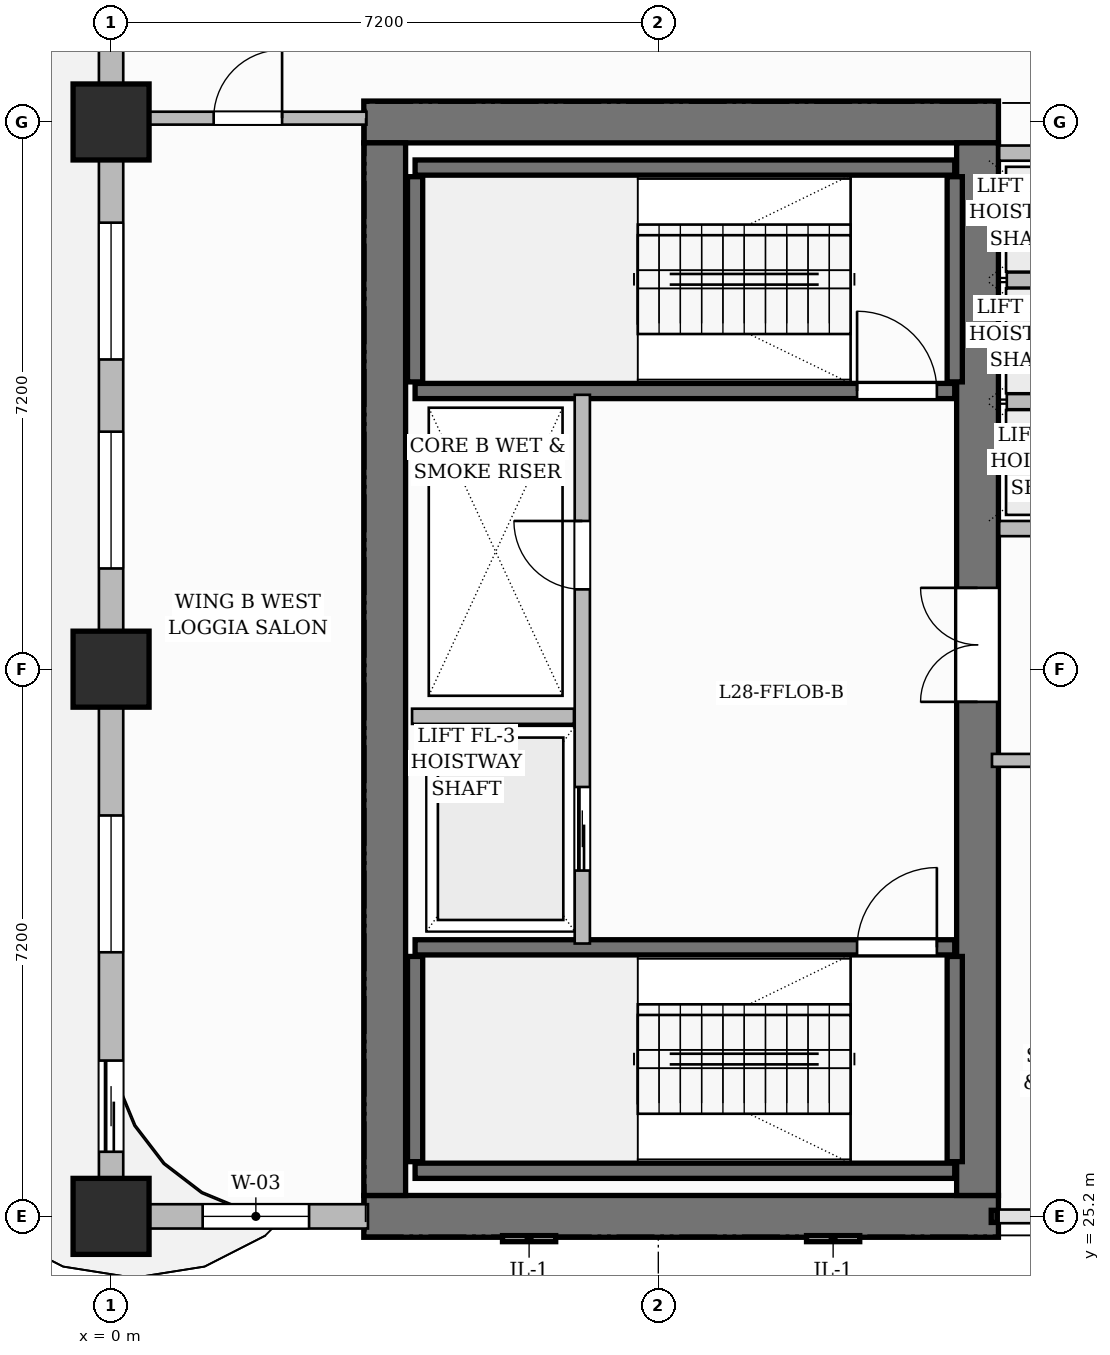
"""IFC4 building model, lengths in metres.
Left out: names, types, materials, properties, quantities, classifications, styles, units other than length and angle.
Written with IfcOpenShell. Run it as: python <this file> out.ifc"""

import sys

from ifc_helpers import new_model, si_unit, direction, frame, frame_2d, origin, origin_2d, place, context, subcontext, project, spatial, rectangle, extrude, source, transform, mapped, element, fill, save


model = new_model("IFC4")
c1 = context("Model", 3, precision=1e-05, world=origin(), true_north=direction((0.0, 1.0)))
c2 = subcontext(c1, "Body", "Model", "MODEL_VIEW")
j1 = project(units=[si_unit("LENGTHUNIT", "METRE"), si_unit("PLANEANGLEUNIT", "RADIAN")], contexts=[c1])
p1 = place(None, origin())
s1 = spatial("IfcSite", under=j1, at=p1, CompositionType="ELEMENT")
p2 = place(p1, origin())
s2 = spatial("IfcBuilding", under=s1, at=p2, CompositionType="ELEMENT")
p3 = place(p2, frame((0.0, 0.0, 115.5)))
s3 = spatial("IfcBuildingStorey", under=s2, at=p3, CompositionType="ELEMENT", Elevation=115.5)
for number, where, z_axis, x_axis in (
    (1, (3.325, 25.2, 0.0), (0.0, 0.0, 1.0), (1.0, 0.0, 0.0)),
    (2, (3.325, 39.6, 0.0), (0.0, 0.0, 1.0), (1.0, 0.0, 0.0)),
):
    element("IfcWall", number, at=place(p3, frame(where, z_axis=z_axis, x_axis=x_axis)), inside=s3, PredefinedType="SHEAR", context=c2, shape_type="SweptSolid", body=[
        extrude(rectangle(XDim=8.35, YDim=0.55, at=frame_2d((4.175, 0.0))), origin(), (0.0, 0.0, 1.0), 3.7),
    ])
p4 = place(p3, frame((3.6, 25.475, 0.0), z_axis=(0.0, 0.0, 1.0), x_axis=(0.0, 1.0, 0.0)))
e3 = element("IfcWall", 3, at=p4, inside=s3, PredefinedType="SHEAR", context=c2, shape_type="SweptSolid", body=[
    extrude(rectangle(XDim=13.85, YDim=0.55, at=frame_2d((6.925, 0.0))), origin(), (0.0, 0.0, 1.0), 3.7),
])
p5 = place(p3, frame((11.4, 25.475, 0.0), z_axis=(0.0, 0.0, 1.0), x_axis=(0.0, 1.0, 0.0)))
e4 = element("IfcWall", 4, at=p5, inside=s3, PredefinedType="SHEAR", context=c2, shape_type="SweptSolid", body=[
    extrude(rectangle(XDim=13.85, YDim=0.55, at=frame_2d((6.925, 0.0))), origin(), (0.0, 0.0, 1.0), 3.7),
])
p6 = place(p5, frame((6.495, 0.0, 0.0)))
e5 = element("IfcOpeningElement", 5, at=p6, cuts=e4, PredefinedType="OPENING", context=c2, shape_type="SweptSolid", body=[
    extrude(rectangle(XDim=1.5, YDim=2.2, at=frame_2d((0.75, 1.1))), frame((0.0, 0.285, 0.0), z_axis=(0.0, -1.0, 0.0), x_axis=(1.0, 0.0, 0.0)), (0.0, 0.0, 1.0), 0.57),
])
m1 = source(origin(), c2, "Body", "SweptSolid", [
    extrude(rectangle(XDim=1.0, YDim=1.0, at=origin_2d()), origin(), (0.0, 0.0, 1.0), 3.7),
])
for number, where, z_axis, x_axis in (
    (6, (0.0, 25.2, 0.0), (0.0, 0.0, 1.0), (1.0, 0.0, 0.0)),
    (7, (0.0, 32.4, 0.0), (0.0, 0.0, 1.0), (1.0, 0.0, 0.0)),
    (8, (0.0, 39.6, 0.0), (0.0, 0.0, 1.0), (1.0, 0.0, 0.0)),
):
    element("IfcColumn", number, at=place(p3, frame(where, z_axis=z_axis, x_axis=x_axis)), inside=s3, PredefinedType="COLUMN", context=c2, shape_type="MappedRepresentation", body=[
        mapped(m1, transform((0.0, 0.0, 0.0), scale=1.0)),
    ])
p7 = place(p3, frame((4.0, 25.8, 0.0), z_axis=(0.0, 0.0, 1.0), x_axis=(1.0, 0.0, 0.0)))
e9 = element("IfcWall", 9, at=p7, inside=s3, PredefinedType="SHEAR", context=c2, shape_type="SweptSolid", body=[
    extrude(rectangle(XDim=7.1, YDim=0.2, at=frame_2d((3.55, 0.0))), origin(), (0.0, 0.0, 1.0), 3.7),
])
for number, where, z_axis, x_axis in (
    (10, (4.0, 25.92, 0.0), (0.0, 0.0, 1.0), (0.0, 1.0, 0.0)),
    (11, (11.1, 25.92, 0.0), (0.0, 0.0, 1.0), (0.0, 1.0, 0.0)),
):
    element("IfcWall", number, at=place(p3, frame(where, z_axis=z_axis, x_axis=x_axis)), inside=s3, PredefinedType="SHEAR", context=c2, shape_type="SweptSolid", body=[
        extrude(rectangle(XDim=2.7, YDim=0.2, at=frame_2d((1.35, 0.0))), origin(), (0.0, 0.0, 1.0), 3.7),
    ])
p8 = place(p3, frame((4.0, 28.74, 0.0), z_axis=(0.0, 0.0, 1.0), x_axis=(1.0, 0.0, 0.0)))
e12 = element("IfcWall", 12, at=p8, inside=s3, PredefinedType="SHEAR", context=c2, shape_type="SweptSolid", body=[
    extrude(rectangle(XDim=7.1, YDim=0.2, at=frame_2d((3.55, 0.0))), origin(), (0.0, 0.0, 1.0), 3.7),
])
p9 = place(p8, frame((5.815, 0.0, 0.0)))
e13 = element("IfcOpeningElement", 13, at=p9, cuts=e12, PredefinedType="OPENING", context=c2, shape_type="SweptSolid", body=[
    extrude(rectangle(XDim=1.05, YDim=2.2, at=frame_2d((0.525, 1.1))), frame((0.0, 0.11, 0.0), z_axis=(0.0, -1.0, 0.0), x_axis=(1.0, 0.0, 0.0)), (0.0, 0.0, 1.0), 0.22),
])
p10 = place(p3, frame((4.0, 39.0, 0.0), z_axis=(0.0, 0.0, 1.0), x_axis=(1.0, 0.0, 0.0)))
e14 = element("IfcWall", 14, at=p10, inside=s3, PredefinedType="SHEAR", context=c2, shape_type="SweptSolid", body=[
    extrude(rectangle(XDim=7.1, YDim=0.2, at=frame_2d((3.55, 0.0))), origin(), (0.0, 0.0, 1.0), 3.7),
])
for number, where, z_axis, x_axis in (
    (15, (4.0, 36.18, 0.0), (0.0, 0.0, 1.0), (0.0, 1.0, 0.0)),
    (16, (11.1, 36.18, 0.0), (0.0, 0.0, 1.0), (0.0, 1.0, 0.0)),
):
    element("IfcWall", number, at=place(p3, frame(where, z_axis=z_axis, x_axis=x_axis)), inside=s3, PredefinedType="SHEAR", context=c2, shape_type="SweptSolid", body=[
        extrude(rectangle(XDim=2.7, YDim=0.2, at=frame_2d((1.35, 0.0))), origin(), (0.0, 0.0, 1.0), 3.7),
    ])
p11 = place(p3, frame((4.0, 36.06, 0.0), z_axis=(0.0, 0.0, 1.0), x_axis=(1.0, 0.0, 0.0)))
e17 = element("IfcWall", 17, at=p11, inside=s3, PredefinedType="SHEAR", context=c2, shape_type="SweptSolid", body=[
    extrude(rectangle(XDim=7.1, YDim=0.2, at=frame_2d((3.55, 0.0))), origin(), (0.0, 0.0, 1.0), 3.7),
])
p12 = place(p11, frame((5.815, 0.0, 0.0)))
e18 = element("IfcOpeningElement", 18, at=p12, cuts=e17, PredefinedType="OPENING", context=c2, shape_type="SweptSolid", body=[
    extrude(rectangle(XDim=1.05, YDim=2.2, at=frame_2d((0.525, 1.1))), frame((0.0, 0.11, 0.0), z_axis=(0.0, -1.0, 0.0), x_axis=(1.0, 0.0, 0.0)), (0.0, 0.0, 1.0), 0.22),
])
p13 = place(p3, frame((6.2, 28.79, 0.0), z_axis=(0.0, 0.0, 1.0), x_axis=(0.0, 1.0, 0.0)))
e19 = element("IfcWall", 19, at=p13, inside=s3, PredefinedType="PARTITIONING", context=c2, shape_type="SweptSolid", body=[
    extrude(rectangle(XDim=7.22, YDim=0.2, at=frame_2d((3.61, 0.0))), origin(), (0.0, 0.0, 1.0), 3.45),
])
p14 = place(p13, frame((4.66, 0.0, 0.0)))
e20 = element("IfcOpeningElement", 20, at=p14, cuts=e19, PredefinedType="OPENING", context=c2, shape_type="SweptSolid", body=[
    extrude(rectangle(XDim=0.9, YDim=2.1, at=frame_2d((0.45, 1.05))), frame((0.0, 0.11, 0.0), z_axis=(0.0, -1.0, 0.0), x_axis=(1.0, 0.0, 0.0)), (0.0, 0.0, 1.0), 0.22),
])
p15 = place(p13, frame((0.96, 0.0, 0.0)))
e21 = element("IfcOpeningElement", 21, at=p15, cuts=e19, PredefinedType="OPENING", context=c2, shape_type="SweptSolid", body=[
    extrude(rectangle(XDim=1.1, YDim=2.2, at=frame_2d((0.55, 1.1))), frame((0.0, 0.11, 0.0), z_axis=(0.0, -1.0, 0.0), x_axis=(1.0, 0.0, 0.0)), (0.0, 0.0, 1.0), 0.22),
])
p16 = place(p3, frame((3.96, 31.78, 0.0), z_axis=(0.0, 0.0, 1.0), x_axis=(1.0, 0.0, 0.0)))
e22 = element("IfcWall", 22, at=p16, inside=s3, PredefinedType="PARTITIONING", context=c2, shape_type="SweptSolid", body=[
    extrude(rectangle(XDim=2.13, YDim=0.2, at=frame_2d((1.065, 0.0))), origin(), (0.0, 0.0, 1.0), 3.45),
])
for number, where, z_axis, x_axis in (
    (23, (11.685, 34.25, 0.0), (0.0, 0.0, 1.0), (1.0, 0.0, 0.0)),
    (24, (11.685, 39.19, 0.0), (0.0, 0.0, 1.0), (1.0, 0.0, 0.0)),
):
    element("IfcWall", number, at=place(p3, frame(where, z_axis=z_axis, x_axis=x_axis)), inside=s3, PredefinedType="PARTITIONING", context=c2, shape_type="SweptSolid", body=[
        extrude(rectangle(XDim=1.985, YDim=0.2, at=frame_2d((0.992, 0.0))), origin(), (0.0, 0.0, 1.0), 3.45),
    ])
for number, where, z_axis, x_axis in (
    (25, (11.785, 35.92, 0.0), (0.0, 0.0, 1.0), (1.0, 0.0, 0.0)),
    (26, (11.785, 37.52, 0.0), (0.0, 0.0, 1.0), (1.0, 0.0, 0.0)),
):
    element("IfcWall", number, at=place(p3, frame(where, z_axis=z_axis, x_axis=x_axis)), inside=s3, PredefinedType="PARTITIONING", context=c2, shape_type="SweptSolid", body=[
        extrude(rectangle(XDim=1.785, YDim=0.2, at=frame_2d((0.893, 0.0))), origin(), (0.0, 0.0, 1.0), 3.45),
    ])
p17 = place(p3, frame((0.24, 39.65, 0.0), z_axis=(0.0, 0.0, 1.0), x_axis=(1.0, 0.0, 0.0)))
e27 = element("IfcWall", 27, at=p17, inside=s3, PredefinedType="PARTITIONING", context=c2, shape_type="SweptSolid", body=[
    extrude(rectangle(XDim=3.12, YDim=0.17, at=frame_2d((1.56, 0.0))), origin(), (0.0, 0.0, 1.0), 3.45),
])
p18 = place(p17, frame((1.11, 0.0, 0.0)))
e28 = element("IfcOpeningElement", 28, at=p18, cuts=e27, PredefinedType="OPENING", context=c2, shape_type="SweptSolid", body=[
    extrude(rectangle(XDim=0.9, YDim=2.15, at=frame_2d((0.45, 1.075))), frame((0.0, 0.095, 0.0), z_axis=(0.0, -1.0, 0.0), x_axis=(1.0, 0.0, 0.0)), (0.0, 0.0, 1.0), 0.19),
])
p19 = place(p3, frame((11.59, 31.2, 0.0), z_axis=(0.0, 0.0, 1.0), x_axis=(1.0, 0.0, 0.0)))
e29 = element("IfcWall", 29, at=p19, inside=s3, PredefinedType="PARTITIONING", context=c2, shape_type="SweptSolid", body=[
    extrude(rectangle(XDim=3.37, YDim=0.17, at=frame_2d((1.685, 0.0))), origin(), (0.0, 0.0, 1.0), 3.45),
])
p20 = place(p19, frame((1.185, 0.0, 0.0)))
e30 = element("IfcOpeningElement", 30, at=p20, cuts=e29, PredefinedType="OPENING", context=c2, shape_type="SweptSolid", body=[
    extrude(rectangle(XDim=0.95, YDim=2.15, at=frame_2d((0.475, 1.075))), frame((0.0, 0.095, 0.0), z_axis=(0.0, -1.0, 0.0), x_axis=(1.0, 0.0, 0.0)), (0.0, 0.0, 1.0), 0.19),
])
p21 = place(p3, frame((0.0, 25.2, 0.0), z_axis=(0.0, 0.0, 1.0), x_axis=(1.0, 0.0, 0.0)))
e31 = element("IfcWall", 31, at=p21, inside=s3, PredefinedType="SOLIDWALL", context=c2, shape_type="SweptSolid", body=[
    extrude(rectangle(XDim=3.38, YDim=0.32, at=frame_2d((1.69, 0.0))), origin(), (0.0, 0.0, 1.0), 3.45),
])
p22 = place(p21, frame((1.205, 0.0, 0.8)))
e32 = element("IfcOpeningElement", 32, at=p22, cuts=e31, PredefinedType="OPENING", context=c2, shape_type="SweptSolid", body=[
    extrude(rectangle(XDim=1.4, YDim=1.85, at=frame_2d((0.7, 0.925))), frame((0.0, 0.17, 0.0), z_axis=(0.0, -1.0, 0.0), x_axis=(1.0, 0.0, 0.0)), (0.0, 0.0, 1.0), 0.34),
])
p23 = place(p3, frame((0.0, 25.25, 0.0), z_axis=(0.0, 0.0, 1.0), x_axis=(0.0, 1.0, 0.0)))
e33 = element("IfcWall", 33, at=p23, inside=s3, PredefinedType="SOLIDWALL", context=c2, shape_type="SweptSolid", body=[
    extrude(rectangle(XDim=21.5, YDim=0.32, at=frame_2d((10.75, 0.0))), origin(), (0.0, 0.0, 1.0), 2.935),
])
p24 = place(p23, frame((18.357, 0.0, 0.0)))
e34 = element("IfcOpeningElement", 34, at=p24, cuts=e33, PredefinedType="OPENING", context=c2, shape_type="SweptSolid", body=[
    extrude(rectangle(XDim=1.2, YDim=2.2, at=frame_2d((0.6, 1.1))), frame((0.0, 0.17, 0.0), z_axis=(0.0, -1.0, 0.0), x_axis=(1.0, 0.0, 0.0)), (0.0, 0.0, 1.0), 0.34),
])
p25 = place(p23, frame((0.8, 0.0, 0.0)))
e35 = element("IfcOpeningElement", 35, at=p25, cuts=e33, PredefinedType="OPENING", context=c2, shape_type="SweptSolid", body=[
    extrude(rectangle(XDim=1.2, YDim=2.2, at=frame_2d((0.6, 1.1))), frame((0.0, 0.17, 0.0), z_axis=(0.0, -1.0, 0.0), x_axis=(1.0, 0.0, 0.0)), (0.0, 0.0, 1.0), 0.34),
])
p26 = place(p23, frame((3.425, 0.0, 0.8)))
e36 = element("IfcOpeningElement", 36, at=p26, cuts=e33, PredefinedType="OPENING", context=c2, shape_type="SweptSolid", body=[
    extrude(rectangle(XDim=1.8, YDim=1.85, at=frame_2d((0.9, 0.925))), frame((0.0, 0.17, 0.0), z_axis=(0.0, -1.0, 0.0), x_axis=(1.0, 0.0, 0.0)), (0.0, 0.0, 1.0), 0.34),
])
p27 = place(p23, frame((8.475, 0.0, 0.8)))
e37 = element("IfcOpeningElement", 37, at=p27, cuts=e33, PredefinedType="OPENING", context=c2, shape_type="SweptSolid", body=[
    extrude(rectangle(XDim=1.8, YDim=1.85, at=frame_2d((0.9, 0.925))), frame((0.0, 0.17, 0.0), z_axis=(0.0, -1.0, 0.0), x_axis=(1.0, 0.0, 0.0)), (0.0, 0.0, 1.0), 0.34),
])
p28 = place(p23, frame((11.225, 0.0, 0.8)))
e38 = element("IfcOpeningElement", 38, at=p28, cuts=e33, PredefinedType="OPENING", context=c2, shape_type="SweptSolid", body=[
    extrude(rectangle(XDim=1.8, YDim=1.85, at=frame_2d((0.9, 0.925))), frame((0.0, 0.17, 0.0), z_axis=(0.0, -1.0, 0.0), x_axis=(1.0, 0.0, 0.0)), (0.0, 0.0, 1.0), 0.34),
])
p29 = place(p23, frame((16.632, 0.0, 0.8)))
e39 = element("IfcOpeningElement", 39, at=p29, cuts=e33, PredefinedType="OPENING", context=c2, shape_type="SweptSolid", body=[
    extrude(rectangle(XDim=1.15, YDim=1.8, at=frame_2d((0.575, 0.9))), frame((0.0, 0.17, 0.0), z_axis=(0.0, -1.0, 0.0), x_axis=(1.0, 0.0, 0.0)), (0.0, 0.0, 1.0), 0.34),
])
m2 = source(origin(), c2, "Body", "SweptSolid", [
    extrude(rectangle(XDim=1.05, YDim=2.2, at=frame_2d((0.525, 1.1))), frame((0.0, 0.025, 0.0), z_axis=(0.0, -1.0, 0.0), x_axis=(1.0, 0.0, 0.0)), (0.0, 0.0, 1.0), 0.05),
])
p30 = place(p9, origin())
e40 = element("IfcDoor", 40, at=p30, inside=s3, OperationType="SINGLE_SWING_RIGHT", PredefinedType="DOOR", context=c2, shape_type="MappedRepresentation", body=[
    mapped(m2, transform((0.0, 0.0, 0.0), scale=1.0)),
])
fill(e13, e40)
p31 = place(p12, origin())
e41 = element("IfcDoor", 41, at=p31, inside=s3, OperationType="SINGLE_SWING_LEFT", PredefinedType="DOOR", context=c2, shape_type="MappedRepresentation", body=[
    mapped(m2, transform((0.0, 0.0, 0.0), scale=1.0)),
])
fill(e18, e41)
m3 = source(origin(), c2, "Body", "SweptSolid", [
    extrude(rectangle(XDim=0.9, YDim=2.1, at=frame_2d((0.45, 1.05))), frame((0.0, 0.025, 0.0), z_axis=(0.0, -1.0, 0.0), x_axis=(1.0, 0.0, 0.0)), (0.0, 0.0, 1.0), 0.05),
])
p32 = place(p14, origin())
e42 = element("IfcDoor", 42, at=p32, inside=s3, OperationType="SINGLE_SWING_RIGHT", PredefinedType="DOOR", context=c2, shape_type="MappedRepresentation", body=[
    mapped(m3, transform((0.0, 0.0, 0.0), scale=1.0)),
])
fill(e20, e42)
m4 = source(origin(), c2, "Body", "SweptSolid", [
    extrude(rectangle(XDim=1.5, YDim=2.2, at=frame_2d((0.75, 1.1))), frame((0.0, 0.025, 0.0), z_axis=(0.0, -1.0, 0.0), x_axis=(1.0, 0.0, 0.0)), (0.0, 0.0, 1.0), 0.05),
])
p33 = place(p6, origin())
e43 = element("IfcDoor", 43, at=p33, inside=s3, OperationType="DOUBLE_DOOR_SINGLE_SWING", PredefinedType="DOOR", context=c2, shape_type="MappedRepresentation", body=[
    mapped(m4, transform((0.0, 0.0, 0.0), scale=1.0)),
])
fill(e5, e43)
m5 = source(origin(), c2, "Body", "SweptSolid", [
    extrude(rectangle(XDim=0.9, YDim=2.15, at=frame_2d((0.45, 1.075))), frame((0.0, 0.025, 0.0), z_axis=(0.0, -1.0, 0.0), x_axis=(1.0, 0.0, 0.0)), (0.0, 0.0, 1.0), 0.05),
])
p34 = place(p18, origin())
e44 = element("IfcDoor", 44, at=p34, inside=s3, OperationType="SINGLE_SWING_RIGHT", PredefinedType="DOOR", context=c2, shape_type="MappedRepresentation", body=[
    mapped(m5, transform((0.0, 0.0, 0.0), scale=1.0)),
])
fill(e28, e44)
m6 = source(origin(), c2, "Body", "SweptSolid", [
    extrude(rectangle(XDim=1.1, YDim=2.2, at=frame_2d((0.55, 1.1))), frame((0.0, 0.025, 0.0), z_axis=(0.0, -1.0, 0.0), x_axis=(1.0, 0.0, 0.0)), (0.0, 0.0, 1.0), 0.05),
])
p35 = place(p15, origin())
e45 = element("IfcDoor", 45, at=p35, inside=s3, OperationType="SLIDING_TO_LEFT", PredefinedType="DOOR", context=c2, shape_type="MappedRepresentation", body=[
    mapped(m6, transform((0.0, 0.0, 0.0), scale=1.0)),
])
fill(e21, e45)
m7 = source(origin(), c2, "Body", "SweptSolid", [
    extrude(rectangle(XDim=1.2, YDim=2.2, at=frame_2d((0.6, 1.1))), frame((0.0, 0.025, 0.0), z_axis=(0.0, -1.0, 0.0), x_axis=(1.0, 0.0, 0.0)), (0.0, 0.0, 1.0), 0.05),
])
p36 = place(p25, origin())
e46 = element("IfcDoor", 46, at=p36, inside=s3, OperationType="SLIDING_TO_LEFT", PredefinedType="DOOR", context=c2, shape_type="MappedRepresentation", body=[
    mapped(m7, transform((0.0, 0.0, 0.0), scale=1.0)),
])
fill(e35, e46)
m8 = source(origin(), c2, "Body", "SweptSolid", [
    extrude(rectangle(XDim=1.4, YDim=1.85, at=frame_2d((0.7, 0.925))), frame((0.0, 0.03, 0.0), z_axis=(0.0, -1.0, 0.0), x_axis=(1.0, 0.0, 0.0)), (0.0, 0.0, 1.0), 0.06),
])
p37 = place(p22, origin())
e47 = element("IfcWindow", 47, at=p37, inside=s3, PartitioningType="SINGLE_PANEL", PredefinedType="WINDOW", context=c2, shape_type="MappedRepresentation", body=[
    mapped(m8, transform((0.0, 0.0, 0.0), scale=1.0)),
])
fill(e32, e47)
m9 = source(origin(), c2, "Body", "SweptSolid", [
    extrude(rectangle(XDim=1.8, YDim=1.85, at=frame_2d((0.9, 0.925))), frame((0.0, 0.03, 0.0), z_axis=(0.0, -1.0, 0.0), x_axis=(1.0, 0.0, 0.0)), (0.0, 0.0, 1.0), 0.06),
])
p38 = place(p26, origin())
e48 = element("IfcWindow", 48, at=p38, inside=s3, PartitioningType="DOUBLE_PANEL_VERTICAL", PredefinedType="WINDOW", context=c2, shape_type="MappedRepresentation", body=[
    mapped(m9, transform((0.0, 0.0, 0.0), scale=1.0)),
])
fill(e36, e48)
p39 = place(p27, origin())
e49 = element("IfcWindow", 49, at=p39, inside=s3, PartitioningType="DOUBLE_PANEL_VERTICAL", PredefinedType="WINDOW", context=c2, shape_type="MappedRepresentation", body=[
    mapped(m9, transform((0.0, 0.0, 0.0), scale=1.0)),
])
fill(e37, e49)
p40 = place(p28, origin())
e50 = element("IfcWindow", 50, at=p40, inside=s3, PartitioningType="DOUBLE_PANEL_VERTICAL", PredefinedType="WINDOW", context=c2, shape_type="MappedRepresentation", body=[
    mapped(m9, transform((0.0, 0.0, 0.0), scale=1.0)),
])
fill(e38, e50)
save(model, sys.argv[1])
